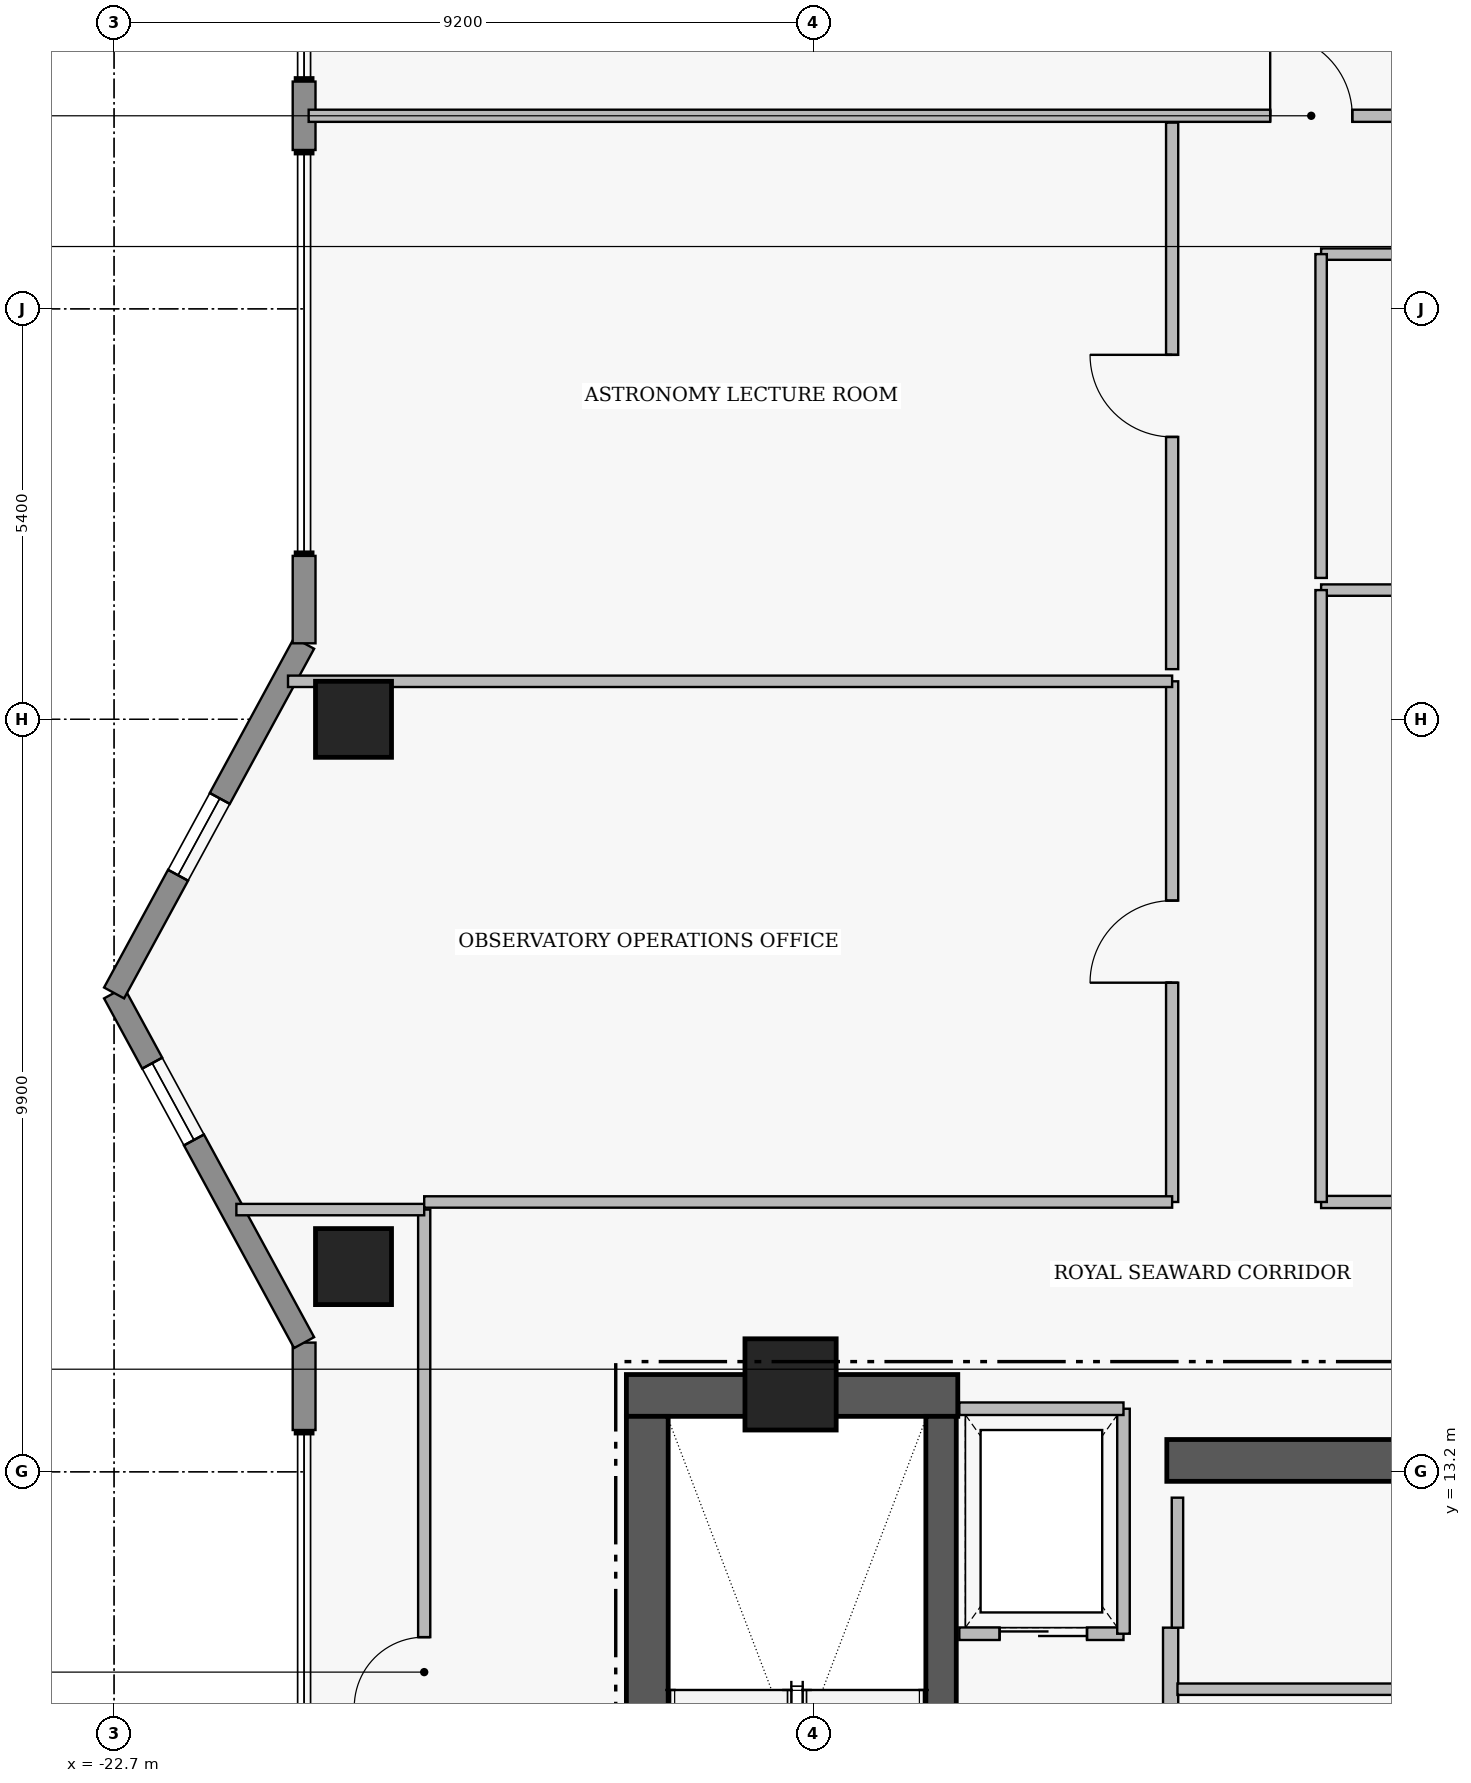
"""IFC4 building model, lengths in metres.
Left out: names, types, materials, properties, quantities, classifications, styles, units other than length and angle.
Written with IfcOpenShell. Run it as: python <this file> out.ifc"""

import sys

from ifc_helpers import new_model, si_unit, direction, frame, frame_2d, origin, origin_2d, place, context, subcontext, project, spatial, rectangle, extrude, element, fill, save


model = new_model("IFC4")
c1 = context("Model", 3, precision=1e-05, world=origin(), true_north=direction((0.0, 1.0)))
c2 = subcontext(c1, "Body", "Model", "MODEL_VIEW")
j1 = project(units=[si_unit("LENGTHUNIT", "METRE"), si_unit("PLANEANGLEUNIT", "RADIAN")], contexts=[c1])
p1 = place(None, origin())
s1 = spatial("IfcSite", under=j1, at=p1, CompositionType="ELEMENT")
p2 = place(p1, origin())
s2 = spatial("IfcBuilding", under=s1, at=p2, CompositionType="ELEMENT")
p3 = place(p2, frame((0.0, 0.0, 292.85)))
s3 = spatial("IfcBuildingStorey", under=s2, at=p3, CompositionType="ELEMENT", Elevation=292.85)
p4 = place(p3, frame((-15.96, 14.205, 0.0), z_axis=(0.0, 0.0, 1.0), x_axis=(1.0, 0.0, 0.0)))
e1 = element("IfcWall", 1, at=p4, inside=s3, PredefinedType="SHEAR", context=c2, shape_type="SweptSolid", body=[
    extrude(rectangle(XDim=4.36, YDim=0.55, at=frame_2d((2.18, 0.0))), origin(), (0.0, 0.0, 1.0), 4.21),
])
p5 = place(p3, frame((-15.685, 4.97, 0.0), z_axis=(0.0, 0.0, 1.0), x_axis=(0.0, 1.0, 0.0)))
e2 = element("IfcWall", 2, at=p5, inside=s3, PredefinedType="SHEAR", context=c2, shape_type="SweptSolid", body=[
    extrude(rectangle(XDim=8.96, YDim=0.55, at=frame_2d((4.48, 0.0))), origin(), (0.0, 0.0, 1.0), 4.21),
])
p6 = place(p3, frame((-8.85, 13.35, 0.0), z_axis=(0.0, 0.0, 1.0), x_axis=(1.0, 0.0, 0.0)))
e3 = element("IfcWall", 3, at=p6, inside=s3, PredefinedType="SHEAR", context=c2, shape_type="SweptSolid", body=[
    extrude(rectangle(XDim=7.6, YDim=0.55, at=frame_2d((3.8, 0.0))), origin(), (0.0, 0.0, 1.0), 4.16),
])
p7 = place(p3, frame((-11.82, 4.97, 0.0), z_axis=(0.0, 0.0, 1.0), x_axis=(0.0, 1.0, 0.0)))
e4 = element("IfcWall", 4, at=p7, inside=s3, PredefinedType="SHEAR", context=c2, shape_type="SweptSolid", body=[
    extrude(rectangle(XDim=8.96, YDim=0.4, at=frame_2d((4.48, 0.0))), origin(), (0.0, 0.0, 1.0), 4.21),
])
p8 = place(p7, frame((0.31, 0.0, 0.0)))
e5 = element("IfcOpeningElement", 5, at=p8, cuts=e4, PredefinedType="OPENING", context=c2, shape_type="SweptSolid", body=[
    extrude(rectangle(XDim=1.12, YDim=2.22, at=frame_2d((0.56, 1.11))), frame((0.0, 0.21, 0.0), z_axis=(0.0, -1.0, 0.0), x_axis=(1.0, 0.0, 0.0)), (0.0, 0.0, 1.0), 0.42),
])
p9 = place(p3, frame((-13.8, 14.35, 0.0), z_axis=(0.0, 0.0, 1.0), x_axis=(1.0, 0.0, 0.0)))
e6 = element("IfcColumn", 6, at=p9, inside=s3, PredefinedType="COLUMN", context=c2, shape_type="SweptSolid", body=[
    extrude(rectangle(XDim=1.2, YDim=1.2, at=origin_2d()), origin(), (0.0, 0.0, 1.0), 4.4),
])
for number, where, z_axis, x_axis in (
    (7, (-19.55, 15.9, 0.0), (0.0, 0.0, 1.0), (1.0, 0.0, 0.0)),
    (8, (-19.55, 23.1, 0.0), (0.0, 0.0, 1.0), (1.0, 0.0, 0.0)),
):
    element("IfcColumn", number, at=place(p3, frame(where, z_axis=z_axis, x_axis=x_axis)), inside=s3, PredefinedType="COLUMN", context=c2, shape_type="SweptSolid", body=[
        extrude(rectangle(XDim=1.0, YDim=1.0, at=origin_2d()), origin(), (0.0, 0.0, 1.0), 4.4),
    ])
p10 = place(p3, frame((-20.2, 13.75, 0.0), z_axis=(0.0, 0.0, 1.0), x_axis=(0.0, 1.0, 0.0)))
e9 = element("IfcWall", 9, at=p10, inside=s3, PredefinedType="STANDARD", context=c2, shape_type="SweptSolid", body=[
    extrude(rectangle(XDim=1.15, YDim=0.3, at=frame_2d((0.575, 0.0))), origin(), (0.0, 0.0, 1.0), 4.16),
])
p11 = place(p3, frame((-20.2, 14.9, 0.0), z_axis=(0.0, 0.0, 1.0), x_axis=(-0.477505494629, 0.878628762675, 0.0)))
e10 = element("IfcWall", 10, at=p11, inside=s3, PredefinedType="STANDARD", context=c2, shape_type="SweptSolid", body=[
    extrude(rectangle(XDim=5.236, YDim=0.3, at=frame_2d((2.618, 0.0))), origin(), (0.0, 0.0, 1.0), 4.16),
])
p12 = place(p11, frame((3.034, 0.0, 1.25)))
e11 = element("IfcOpeningElement", 11, at=p12, cuts=e10, PredefinedType="OPENING", context=c2, shape_type="SweptSolid", body=[
    extrude(rectangle(XDim=1.15, YDim=1.55, at=frame_2d((0.575, 0.775))), frame((0.0, 0.16, 0.0), z_axis=(0.0, -1.0, 0.0), x_axis=(1.0, 0.0, 0.0)), (0.0, 0.0, 1.0), 0.32),
])
p13 = place(p3, frame((-22.7, 19.5, 0.0), z_axis=(0.0, 0.0, 1.0), x_axis=(0.477505494629, 0.878628762675, 0.0)))
e12 = element("IfcWall", 12, at=p13, inside=s3, PredefinedType="STANDARD", context=c2, shape_type="SweptSolid", body=[
    extrude(rectangle(XDim=5.236, YDim=0.3, at=frame_2d((2.618, 0.0))), origin(), (0.0, 0.0, 1.0), 4.16),
])
p14 = place(p13, frame((1.762, 0.0, 1.25)))
e13 = element("IfcOpeningElement", 13, at=p14, cuts=e12, PredefinedType="OPENING", context=c2, shape_type="SweptSolid", body=[
    extrude(rectangle(XDim=1.15, YDim=1.55, at=frame_2d((0.575, 0.775))), frame((0.0, 0.16, 0.0), z_axis=(0.0, -1.0, 0.0), x_axis=(1.0, 0.0, 0.0)), (0.0, 0.0, 1.0), 0.32),
])
p15 = place(p3, frame((-20.2, 24.1, 0.0), z_axis=(0.0, 0.0, 1.0), x_axis=(0.0, 1.0, 0.0)))
e14 = element("IfcWall", 14, at=p15, inside=s3, PredefinedType="STANDARD", context=c2, shape_type="SweptSolid", body=[
    extrude(rectangle(XDim=1.15, YDim=0.3, at=frame_2d((0.575, 0.0))), origin(), (0.0, 0.0, 1.0), 4.16),
])
p16 = place(p3, frame((-20.2, 30.59, 0.0), z_axis=(0.0, 0.0, 1.0), x_axis=(0.0, 1.0, 0.0)))
e15 = element("IfcWall", 15, at=p16, inside=s3, PredefinedType="STANDARD", context=c2, shape_type="SweptSolid", body=[
    extrude(rectangle(XDim=0.9, YDim=0.3, at=frame_2d((0.45, 0.0))), origin(), (0.0, 0.0, 1.0), 4.16),
])
p17 = place(p3, frame((-8.8, 5.05, 0.0), z_axis=(0.0, 0.0, 1.0), x_axis=(0.0, 1.0, 0.0)))
e16 = element("IfcWall", 16, at=p17, inside=s3, PredefinedType="PARTITIONING", context=c2, shape_type="SweptSolid", body=[
    extrude(rectangle(XDim=6.1, YDim=0.2, at=frame_2d((3.05, 0.0))), origin(), (0.0, 0.0, 1.0), 4.16),
])
p18 = place(p17, frame((0.25, 0.0, 0.0)))
e17 = element("IfcOpeningElement", 17, at=p18, cuts=e16, PredefinedType="OPENING", context=c2, shape_type="SweptSolid", body=[
    extrude(rectangle(XDim=1.1, YDim=2.2, at=frame_2d((0.55, 1.1))), frame((0.0, 0.11, 0.0), z_axis=(0.0, -1.0, 0.0), x_axis=(1.0, 0.0, 0.0)), (0.0, 0.0, 1.0), 0.22),
])
p19 = place(p17, frame((3.85, 0.0, 0.0)))
e18 = element("IfcOpeningElement", 18, at=p19, cuts=e16, PredefinedType="OPENING", context=c2, shape_type="SweptSolid", body=[
    extrude(rectangle(XDim=1.1, YDim=2.2, at=frame_2d((0.55, 1.1))), frame((0.0, 0.11, 0.0), z_axis=(0.0, -1.0, 0.0), x_axis=(1.0, 0.0, 0.0)), (0.0, 0.0, 1.0), 0.22),
])
p20 = place(p3, frame((-11.58, 11.07, 0.0), z_axis=(0.0, 0.0, 1.0), x_axis=(1.0, 0.0, 0.0)))
e19 = element("IfcWall", 19, at=p20, inside=s3, PredefinedType="PARTITIONING", context=c2, shape_type="SweptSolid", body=[
    extrude(rectangle(XDim=2.16, YDim=0.165, at=frame_2d((1.08, 0.0))), origin(), (0.0, 0.0, 1.0), 4.16),
])
p21 = place(p20, frame((0.53, 0.0, 0.0)))
e20 = element("IfcOpeningElement", 20, at=p21, cuts=e19, PredefinedType="OPENING", context=c2, shape_type="SweptSolid", body=[
    extrude(rectangle(XDim=1.15, YDim=2.25, at=frame_2d((0.575, 1.125))), frame((0.0, 0.093, 0.0), z_axis=(0.0, -1.0, 0.0), x_axis=(1.0, 0.0, 0.0)), (0.0, 0.0, 1.0), 0.185),
])
p22 = place(p3, frame((-8.71, 10.34, 0.0), z_axis=(0.0, 0.0, 1.0), x_axis=(1.0, 0.0, 0.0)))
e21 = element("IfcWall", 21, at=p22, inside=s3, PredefinedType="PARTITIONING", context=c2, shape_type="SweptSolid", body=[
    extrude(rectangle(XDim=7.42, YDim=0.15, at=frame_2d((3.71, 0.0))), origin(), (0.0, 0.0, 1.0), 4.16),
])
p23 = place(p22, frame((3.26, 0.0, 0.0)))
e22 = element("IfcOpeningElement", 22, at=p23, cuts=e21, PredefinedType="OPENING", context=c2, shape_type="SweptSolid", body=[
    extrude(rectangle(XDim=0.9, YDim=2.15, at=frame_2d((0.45, 1.075))), frame((0.0, 0.085, 0.0), z_axis=(0.0, -1.0, 0.0), x_axis=(1.0, 0.0, 0.0)), (0.0, 0.0, 1.0), 0.17),
])
p24 = place(p3, frame((-18.62, 4.48, 0.0), z_axis=(0.0, 0.0, 1.0), x_axis=(0.0, 1.0, 0.0)))
e23 = element("IfcWall", 23, at=p24, inside=s3, PredefinedType="PARTITIONING", context=c2, shape_type="SweptSolid", body=[
    extrude(rectangle(XDim=12.17, YDim=0.16, at=frame_2d((6.085, 0.0))), origin(), (0.0, 0.0, 1.0), 4.16),
])
p25 = place(p24, frame((5.625, 0.0, 0.0)))
e24 = element("IfcOpeningElement", 24, at=p25, cuts=e23, PredefinedType="OPENING", context=c2, shape_type="SweptSolid", body=[
    extrude(rectangle(XDim=0.92, YDim=2.12, at=frame_2d((0.46, 1.06))), frame((0.0, 0.09, 0.0), z_axis=(0.0, -1.0, 0.0), x_axis=(1.0, 0.0, 0.0)), (0.0, 0.0, 1.0), 0.18),
])
p26 = place(p3, frame((-20.14, 31.04, 0.0), z_axis=(0.0, 0.0, 1.0), x_axis=(1.0, 0.0, 0.0)))
e25 = element("IfcWall", 25, at=p26, inside=s3, PredefinedType="PARTITIONING", context=c2, shape_type="SweptSolid", body=[
    extrude(rectangle(XDim=15.92, YDim=0.16, at=frame_2d((7.96, 0.0))), origin(), (0.0, 0.0, 1.0), 4.16),
])
p27 = place(p26, frame((12.65, 0.0, 0.0)))
e26 = element("IfcOpeningElement", 26, at=p27, cuts=e25, PredefinedType="OPENING", context=c2, shape_type="SweptSolid", body=[
    extrude(rectangle(XDim=1.08, YDim=2.18, at=frame_2d((0.54, 1.09))), frame((0.0, 0.09, 0.0), z_axis=(0.0, -1.0, 0.0), x_axis=(1.0, 0.0, 0.0)), (0.0, 0.0, 1.0), 0.18),
])
p28 = place(p3, frame((-6.82, 16.75, 0.0), z_axis=(0.0, 0.0, 1.0), x_axis=(1.0, 0.0, 0.0)))
e27 = element("IfcWall", 27, at=p28, inside=s3, PredefinedType="PARTITIONING", context=c2, shape_type="SweptSolid", body=[
    extrude(rectangle(XDim=13.64, YDim=0.16, at=frame_2d((6.82, 0.0))), origin(), (0.0, 0.0, 1.0), 4.16),
])
p29 = place(p28, frame((8.58, 0.0, 0.0)))
e28 = element("IfcOpeningElement", 28, at=p29, cuts=e27, PredefinedType="OPENING", context=c2, shape_type="SweptSolid", body=[
    extrude(rectangle(XDim=1.08, YDim=2.18, at=frame_2d((0.54, 1.09))), frame((0.0, 0.09, 0.0), z_axis=(0.0, -1.0, 0.0), x_axis=(1.0, 0.0, 0.0)), (0.0, 0.0, 1.0), 0.18),
])
p30 = place(p3, frame((-8.78, 16.75, 0.0), z_axis=(0.0, 0.0, 1.0), x_axis=(0.0, 1.0, 0.0)))
e29 = element("IfcWall", 29, at=p30, inside=s3, PredefinedType="PARTITIONING", context=c2, shape_type="SweptSolid", body=[
    extrude(rectangle(XDim=6.85, YDim=0.16, at=frame_2d((3.425, 0.0))), origin(), (0.0, 0.0, 1.0), 4.16),
])
p31 = place(p30, frame((2.885, 0.0, 0.0)))
e30 = element("IfcOpeningElement", 30, at=p31, cuts=e29, PredefinedType="OPENING", context=c2, shape_type="SweptSolid", body=[
    extrude(rectangle(XDim=1.08, YDim=2.18, at=frame_2d((0.54, 1.09))), frame((0.0, 0.09, 0.0), z_axis=(0.0, -1.0, 0.0), x_axis=(1.0, 0.0, 0.0)), (0.0, 0.0, 1.0), 0.18),
])
p32 = place(p3, frame((-8.78, 23.76, 0.0), z_axis=(0.0, 0.0, 1.0), x_axis=(0.0, 1.0, 0.0)))
e31 = element("IfcWall", 31, at=p32, inside=s3, PredefinedType="PARTITIONING", context=c2, shape_type="SweptSolid", body=[
    extrude(rectangle(XDim=7.19, YDim=0.16, at=frame_2d((3.595, 0.0))), origin(), (0.0, 0.0, 1.0), 4.16),
])
p33 = place(p32, frame((3.055, 0.0, 0.0)))
e32 = element("IfcOpeningElement", 32, at=p33, cuts=e31, PredefinedType="OPENING", context=c2, shape_type="SweptSolid", body=[
    extrude(rectangle(XDim=1.08, YDim=2.18, at=frame_2d((0.54, 1.09))), frame((0.0, 0.09, 0.0), z_axis=(0.0, -1.0, 0.0), x_axis=(1.0, 0.0, 0.0)), (0.0, 0.0, 1.0), 0.18),
])
p34 = place(p3, frame((-9.42, 11.07, 0.0), z_axis=(0.0, 0.0, 1.0), x_axis=(0.0, 1.0, 0.0)))
e33 = element("IfcWall", 33, at=p34, inside=s3, PredefinedType="PARTITIONING", context=c2, shape_type="SweptSolid", body=[
    extrude(rectangle(XDim=2.96, YDim=0.165, at=frame_2d((1.48, 0.0))), origin(), (0.0, 0.0, 1.0), 4.16),
])
p35 = place(p3, frame((-11.58, 14.03, 0.0), z_axis=(0.0, 0.0, 1.0), x_axis=(1.0, 0.0, 0.0)))
e34 = element("IfcWall", 34, at=p35, inside=s3, PredefinedType="PARTITIONING", context=c2, shape_type="SweptSolid", body=[
    extrude(rectangle(XDim=2.16, YDim=0.165, at=frame_2d((1.08, 0.0))), origin(), (0.0, 0.0, 1.0), 4.16),
])
p36 = place(p3, frame((-8.71, 11.15, 0.0), z_axis=(0.0, 0.0, 1.0), x_axis=(0.0, 1.0, 0.0)))
e35 = element("IfcWall", 35, at=p36, inside=s3, PredefinedType="PARTITIONING", context=c2, shape_type="SweptSolid", body=[
    extrude(rectangle(XDim=1.71, YDim=0.15, at=frame_2d((0.855, 0.0))), origin(), (0.0, 0.0, 1.0), 4.16),
])
p37 = place(p3, frame((-21.091, 16.65, 0.0), z_axis=(0.0, 0.0, 1.0), x_axis=(1.0, 0.0, 0.0)))
e36 = element("IfcWall", 36, at=p37, inside=s3, PredefinedType="PARTITIONING", context=c2, shape_type="SweptSolid", body=[
    extrude(rectangle(XDim=2.471, YDim=0.15, at=frame_2d((1.235, 0.0))), origin(), (0.0, 0.0, 1.0), 4.16),
])
p38 = place(p3, frame((-6.82, 24.8, 0.0), z_axis=(0.0, 0.0, 1.0), x_axis=(1.0, 0.0, 0.0)))
e37 = element("IfcWall", 37, at=p38, inside=s3, PredefinedType="PARTITIONING", context=c2, shape_type="SweptSolid", body=[
    extrude(rectangle(XDim=13.64, YDim=0.15, at=frame_2d((6.82, 0.0))), origin(), (0.0, 0.0, 1.0), 1.76),
])
p39 = place(p3, frame((-6.82, 16.75, 0.0), z_axis=(0.0, 0.0, 1.0), x_axis=(0.0, 1.0, 0.0)))
e38 = element("IfcWall", 38, at=p39, inside=s3, PredefinedType="PARTITIONING", context=c2, shape_type="SweptSolid", body=[
    extrude(rectangle(XDim=8.05, YDim=0.15, at=frame_2d((4.025, 0.0))), origin(), (0.0, 0.0, 1.0), 4.16),
])
p40 = place(p3, frame((-6.82, 29.22, 0.0), z_axis=(0.0, 0.0, 1.0), x_axis=(1.0, 0.0, 0.0)))
e39 = element("IfcWall", 39, at=p40, inside=s3, PredefinedType="PARTITIONING", context=c2, shape_type="SweptSolid", body=[
    extrude(rectangle(XDim=2.68, YDim=0.15, at=frame_2d((1.34, 0.0))), origin(), (0.0, 0.0, 1.0), 4.16),
])
p41 = place(p3, frame((-6.82, 24.96, 0.0), z_axis=(0.0, 0.0, 1.0), x_axis=(0.0, 1.0, 0.0)))
e40 = element("IfcWall", 40, at=p41, inside=s3, PredefinedType="PARTITIONING", context=c2, shape_type="SweptSolid", body=[
    extrude(rectangle(XDim=4.26, YDim=0.15, at=frame_2d((2.13, 0.0))), origin(), (0.0, 0.0, 1.0), 4.16),
])
p42 = place(p3, frame((-18.62, 16.75, 0.0), z_axis=(0.0, 0.0, 1.0), x_axis=(1.0, 0.0, 0.0)))
e41 = element("IfcWall", 41, at=p42, inside=s3, PredefinedType="PARTITIONING", context=c2, shape_type="SweptSolid", body=[
    extrude(rectangle(XDim=9.84, YDim=0.15, at=frame_2d((4.92, 0.0))), origin(), (0.0, 0.0, 1.0), 4.16),
])
p43 = place(p3, frame((-20.412, 23.6, 0.0), z_axis=(0.0, 0.0, 1.0), x_axis=(1.0, 0.0, 0.0)))
e42 = element("IfcWall", 42, at=p43, inside=s3, PredefinedType="PARTITIONING", context=c2, shape_type="SweptSolid", body=[
    extrude(rectangle(XDim=11.632, YDim=0.15, at=frame_2d((5.816, 0.0))), origin(), (0.0, 0.0, 1.0), 4.16),
])
p44 = place(p12, origin())
e43 = element("IfcWindow", 43, at=p44, inside=s3, PartitioningType="SINGLE_PANEL", PredefinedType="WINDOW", context=c2, shape_type="SweptSolid", body=[
    extrude(rectangle(XDim=1.15, YDim=1.55, at=frame_2d((0.575, 0.775))), frame((0.0, 0.03, 0.0), z_axis=(0.0, -1.0, 0.0), x_axis=(1.0, 0.0, 0.0)), (0.0, 0.0, 1.0), 0.06),
])
fill(e11, e43)
p45 = place(p14, origin())
e44 = element("IfcWindow", 44, at=p45, inside=s3, PartitioningType="SINGLE_PANEL", PredefinedType="WINDOW", context=c2, shape_type="SweptSolid", body=[
    extrude(rectangle(XDim=1.15, YDim=1.55, at=frame_2d((0.575, 0.775))), frame((0.0, 0.03, 0.0), z_axis=(0.0, -1.0, 0.0), x_axis=(1.0, 0.0, 0.0)), (0.0, 0.0, 1.0), 0.06),
])
fill(e13, e44)
p46 = place(p21, origin())
e45 = element("IfcDoor", 45, at=p46, inside=s3, OperationType="SLIDING_TO_LEFT", PredefinedType="DOOR", context=c2, shape_type="SweptSolid", body=[
    extrude(rectangle(XDim=1.15, YDim=2.25, at=frame_2d((0.575, 1.125))), frame((0.0, 0.025, 0.0), z_axis=(0.0, -1.0, 0.0), x_axis=(1.0, 0.0, 0.0)), (0.0, 0.0, 1.0), 0.05),
])
fill(e20, e45)
p47 = place(p25, origin())
e46 = element("IfcDoor", 46, at=p47, inside=s3, OperationType="SINGLE_SWING_LEFT", PredefinedType="DOOR", context=c2, shape_type="SweptSolid", body=[
    extrude(rectangle(XDim=0.92, YDim=2.12, at=frame_2d((0.46, 1.06))), frame((0.0, 0.025, 0.0), z_axis=(0.0, -1.0, 0.0), x_axis=(1.0, 0.0, 0.0)), (0.0, 0.0, 1.0), 0.05),
])
fill(e24, e46)
p48 = place(p27, origin())
e47 = element("IfcDoor", 47, at=p48, inside=s3, OperationType="SINGLE_SWING_LEFT", PredefinedType="DOOR", context=c2, shape_type="SweptSolid", body=[
    extrude(rectangle(XDim=1.08, YDim=2.18, at=frame_2d((0.54, 1.09))), frame((0.0, 0.025, 0.0), z_axis=(0.0, -1.0, 0.0), x_axis=(1.0, 0.0, 0.0)), (0.0, 0.0, 1.0), 0.05),
])
fill(e26, e47)
p49 = place(p31, origin())
e48 = element("IfcDoor", 48, at=p49, inside=s3, OperationType="SINGLE_SWING_LEFT", PredefinedType="DOOR", context=c2, shape_type="SweptSolid", body=[
    extrude(rectangle(XDim=1.08, YDim=2.18, at=frame_2d((0.54, 1.09))), frame((0.0, 0.025, 0.0), z_axis=(0.0, -1.0, 0.0), x_axis=(1.0, 0.0, 0.0)), (0.0, 0.0, 1.0), 0.05),
])
fill(e30, e48)
p50 = place(p33, origin())
e49 = element("IfcDoor", 49, at=p50, inside=s3, OperationType="SINGLE_SWING_RIGHT", PredefinedType="DOOR", context=c2, shape_type="SweptSolid", body=[
    extrude(rectangle(XDim=1.08, YDim=2.18, at=frame_2d((0.54, 1.09))), frame((0.0, 0.025, 0.0), z_axis=(0.0, -1.0, 0.0), x_axis=(1.0, 0.0, 0.0)), (0.0, 0.0, 1.0), 0.05),
])
fill(e32, e49)
save(model, sys.argv[1])
